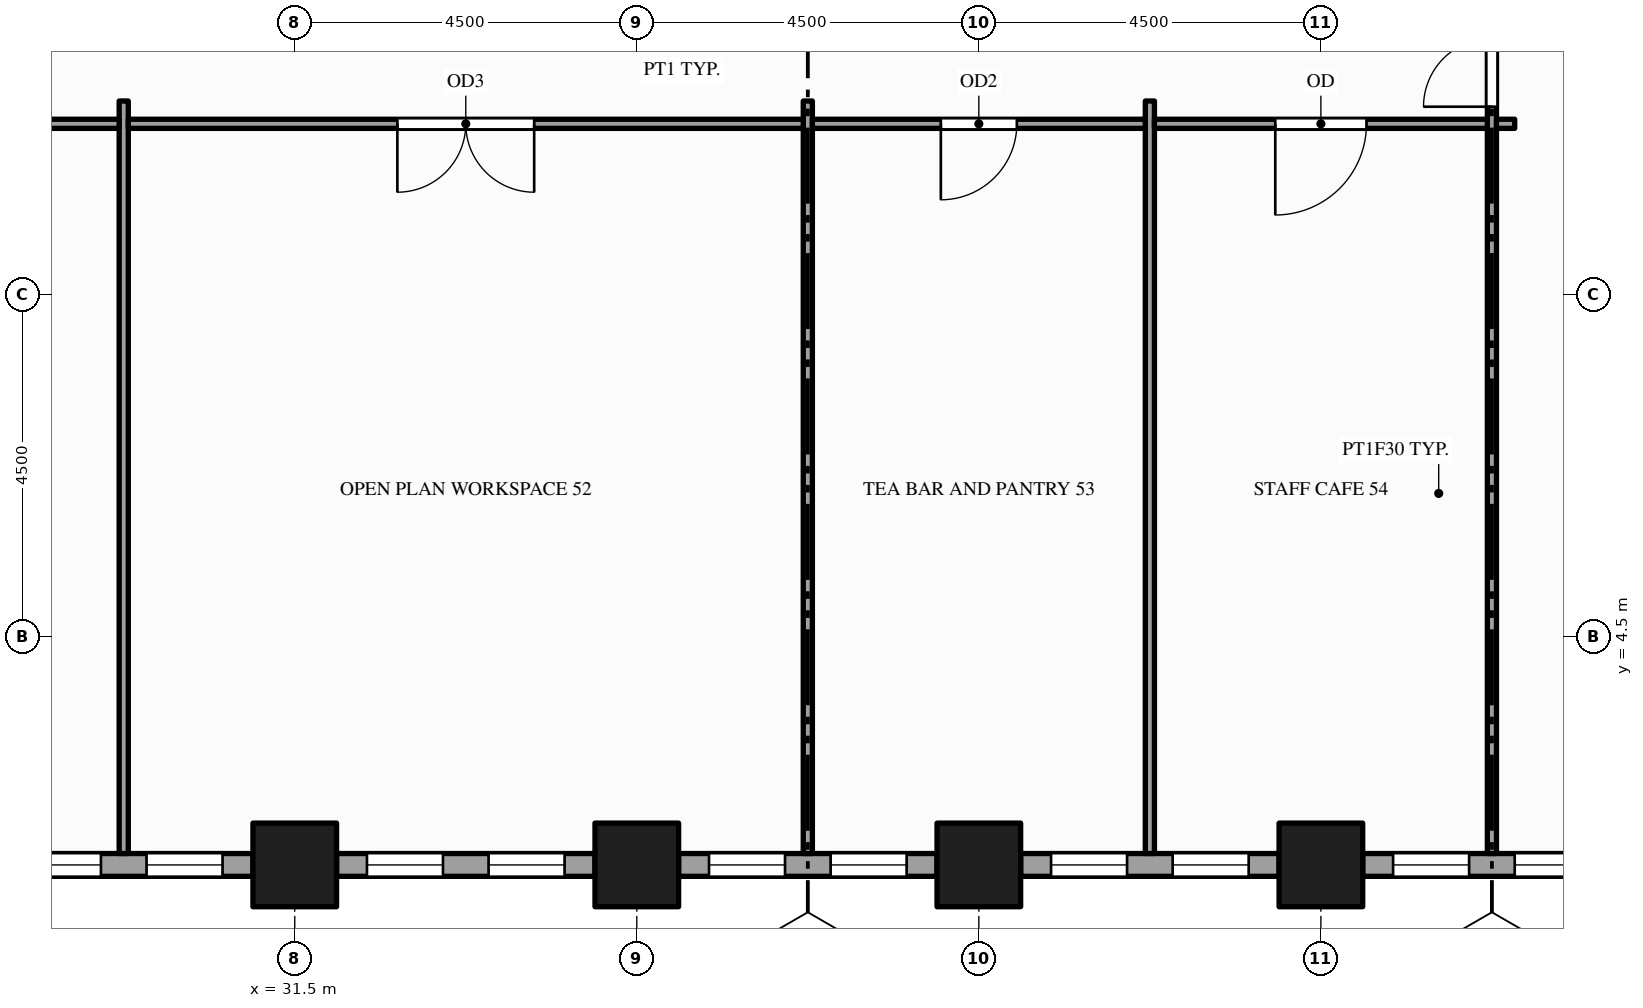
"""IFC4 building model, lengths in metres.
Left out: names, types, materials, properties, quantities, classifications, styles, units other than length and angle.
Written with IfcOpenShell. Run it as: python <this file> out.ifc"""

import sys

from ifc_helpers import new_model, si_unit, direction, frame, frame_2d, origin, origin_2d, place, context, subcontext, project, spatial, rectangle, hollow_rectangle, extrude, element, fill, save


model = new_model("IFC4")
c1 = context("Model", 3, precision=1e-05, world=origin(), true_north=direction((0.0, 1.0)))
c2 = subcontext(c1, "Body", "Model", "MODEL_VIEW")
j1 = project(units=[si_unit("LENGTHUNIT", "METRE"), si_unit("PLANEANGLEUNIT", "RADIAN")], contexts=[c1])
p1 = place(None, origin())
s1 = spatial("IfcSite", under=j1, at=p1, CompositionType="ELEMENT")
p2 = place(p1, origin())
s2 = spatial("IfcBuilding", under=s1, at=p2, CompositionType="ELEMENT")
p3 = place(p2, frame((0.0, 0.0, 41.0)))
s3 = spatial("IfcBuildingStorey", under=s2, at=p3, CompositionType="ELEMENT", Elevation=41.0)
for number, where, z_axis, x_axis in (
    (1, (31.5, 1.5, -0.15), (0.0, 0.0, 1.0), (1.0, 0.0, 0.0)),
    (2, (36.0, 1.5, -0.15), (0.0, 0.0, 1.0), (1.0, 0.0, 0.0)),
    (3, (40.5, 1.5, -0.15), (0.0, 0.0, 1.0), (1.0, 0.0, 0.0)),
    (4, (45.0, 1.5, -0.15), (0.0, 0.0, 1.0), (1.0, 0.0, 0.0)),
):
    element("IfcColumn", number, at=place(p3, frame(where, z_axis=z_axis, x_axis=x_axis)), inside=s3, PredefinedType="COLUMN", context=c2, shape_type="SweptSolid", body=[
        extrude(hollow_rectangle(XDim=1.1, YDim=1.1, WallThickness=0.06, at=origin_2d()), origin(), (0.0, 0.0, 1.0), 4.0),
    ])
p4 = place(p3, frame((27.55, 1.5, 0.0), z_axis=(0.0, 0.0, 1.0), x_axis=(1.0, 0.0, 0.0)))
e5 = element("IfcWall", 5, at=p4, inside=s3, PredefinedType="STANDARD", context=c2, shape_type="SweptSolid", body=[
    extrude(rectangle(XDim=3.4, YDim=0.3, at=frame_2d((1.7, 0.0))), origin(), (0.0, 0.0, 1.0), 3.144),
])
p5 = place(p4, frame((0.4, 0.0, 0.9)))
e6 = element("IfcOpeningElement", 6, at=p5, cuts=e5, PredefinedType="OPENING", context=c2, shape_type="SweptSolid", body=[
    extrude(rectangle(XDim=1.0, YDim=2.0, at=frame_2d((0.5, 1.0))), frame((0.0, 0.16, 0.0), z_axis=(0.0, -1.0, 0.0), x_axis=(1.0, 0.0, 0.0)), (0.0, 0.0, 1.0), 0.32),
])
p6 = place(p4, frame((2.0, 0.0, 0.9)))
e7 = element("IfcOpeningElement", 7, at=p6, cuts=e5, PredefinedType="OPENING", context=c2, shape_type="SweptSolid", body=[
    extrude(rectangle(XDim=1.0, YDim=2.0, at=frame_2d((0.5, 1.0))), frame((0.0, 0.16, 0.0), z_axis=(0.0, -1.0, 0.0), x_axis=(1.0, 0.0, 0.0)), (0.0, 0.0, 1.0), 0.32),
])
p7 = place(p3, frame((32.05, 1.5, 0.0), z_axis=(0.0, 0.0, 1.0), x_axis=(1.0, 0.0, 0.0)))
e8 = element("IfcWall", 8, at=p7, inside=s3, PredefinedType="STANDARD", context=c2, shape_type="SweptSolid", body=[
    extrude(rectangle(XDim=3.4, YDim=0.3, at=frame_2d((1.7, 0.0))), origin(), (0.0, 0.0, 1.0), 3.144),
])
p8 = place(p7, frame((0.4, 0.0, 0.9)))
e9 = element("IfcOpeningElement", 9, at=p8, cuts=e8, PredefinedType="OPENING", context=c2, shape_type="SweptSolid", body=[
    extrude(rectangle(XDim=1.0, YDim=2.0, at=frame_2d((0.5, 1.0))), frame((0.0, 0.16, 0.0), z_axis=(0.0, -1.0, 0.0), x_axis=(1.0, 0.0, 0.0)), (0.0, 0.0, 1.0), 0.32),
])
p9 = place(p7, frame((2.0, 0.0, 0.9)))
e10 = element("IfcOpeningElement", 10, at=p9, cuts=e8, PredefinedType="OPENING", context=c2, shape_type="SweptSolid", body=[
    extrude(rectangle(XDim=1.0, YDim=2.0, at=frame_2d((0.5, 1.0))), frame((0.0, 0.16, 0.0), z_axis=(0.0, -1.0, 0.0), x_axis=(1.0, 0.0, 0.0)), (0.0, 0.0, 1.0), 0.32),
])
p10 = place(p3, frame((36.55, 1.5, 0.0), z_axis=(0.0, 0.0, 1.0), x_axis=(1.0, 0.0, 0.0)))
e11 = element("IfcWall", 11, at=p10, inside=s3, PredefinedType="STANDARD", context=c2, shape_type="SweptSolid", body=[
    extrude(rectangle(XDim=3.4, YDim=0.3, at=frame_2d((1.7, 0.0))), origin(), (0.0, 0.0, 1.0), 3.144),
])
p11 = place(p10, frame((0.4, 0.0, 0.9)))
e12 = element("IfcOpeningElement", 12, at=p11, cuts=e11, PredefinedType="OPENING", context=c2, shape_type="SweptSolid", body=[
    extrude(rectangle(XDim=1.0, YDim=2.0, at=frame_2d((0.5, 1.0))), frame((0.0, 0.16, 0.0), z_axis=(0.0, -1.0, 0.0), x_axis=(1.0, 0.0, 0.0)), (0.0, 0.0, 1.0), 0.32),
])
p12 = place(p10, frame((2.0, 0.0, 0.9)))
e13 = element("IfcOpeningElement", 13, at=p12, cuts=e11, PredefinedType="OPENING", context=c2, shape_type="SweptSolid", body=[
    extrude(rectangle(XDim=1.0, YDim=2.0, at=frame_2d((0.5, 1.0))), frame((0.0, 0.16, 0.0), z_axis=(0.0, -1.0, 0.0), x_axis=(1.0, 0.0, 0.0)), (0.0, 0.0, 1.0), 0.32),
])
p13 = place(p3, frame((41.05, 1.5, 0.0), z_axis=(0.0, 0.0, 1.0), x_axis=(1.0, 0.0, 0.0)))
e14 = element("IfcWall", 14, at=p13, inside=s3, PredefinedType="STANDARD", context=c2, shape_type="SweptSolid", body=[
    extrude(rectangle(XDim=3.4, YDim=0.3, at=frame_2d((1.7, 0.0))), origin(), (0.0, 0.0, 1.0), 3.144),
])
p14 = place(p13, frame((0.4, 0.0, 0.9)))
e15 = element("IfcOpeningElement", 15, at=p14, cuts=e14, PredefinedType="OPENING", context=c2, shape_type="SweptSolid", body=[
    extrude(rectangle(XDim=1.0, YDim=2.0, at=frame_2d((0.5, 1.0))), frame((0.0, 0.16, 0.0), z_axis=(0.0, -1.0, 0.0), x_axis=(1.0, 0.0, 0.0)), (0.0, 0.0, 1.0), 0.32),
])
p15 = place(p13, frame((2.0, 0.0, 0.9)))
e16 = element("IfcOpeningElement", 16, at=p15, cuts=e14, PredefinedType="OPENING", context=c2, shape_type="SweptSolid", body=[
    extrude(rectangle(XDim=1.0, YDim=2.0, at=frame_2d((0.5, 1.0))), frame((0.0, 0.16, 0.0), z_axis=(0.0, -1.0, 0.0), x_axis=(1.0, 0.0, 0.0)), (0.0, 0.0, 1.0), 0.32),
])
p16 = place(p3, frame((45.55, 1.5, 0.0), z_axis=(0.0, 0.0, 1.0), x_axis=(1.0, 0.0, 0.0)))
e17 = element("IfcWall", 17, at=p16, inside=s3, PredefinedType="STANDARD", context=c2, shape_type="SweptSolid", body=[
    extrude(rectangle(XDim=3.4, YDim=0.3, at=frame_2d((1.7, 0.0))), origin(), (0.0, 0.0, 1.0), 3.144),
])
p17 = place(p16, frame((0.4, 0.0, 0.9)))
e18 = element("IfcOpeningElement", 18, at=p17, cuts=e17, PredefinedType="OPENING", context=c2, shape_type="SweptSolid", body=[
    extrude(rectangle(XDim=1.0, YDim=2.0, at=frame_2d((0.5, 1.0))), frame((0.0, 0.16, 0.0), z_axis=(0.0, -1.0, 0.0), x_axis=(1.0, 0.0, 0.0)), (0.0, 0.0, 1.0), 0.32),
])
p18 = place(p16, frame((2.0, 0.0, 0.9)))
e19 = element("IfcOpeningElement", 19, at=p18, cuts=e17, PredefinedType="OPENING", context=c2, shape_type="SweptSolid", body=[
    extrude(rectangle(XDim=1.0, YDim=2.0, at=frame_2d((0.5, 1.0))), frame((0.0, 0.16, 0.0), z_axis=(0.0, -1.0, 0.0), x_axis=(1.0, 0.0, 0.0)), (0.0, 0.0, 1.0), 0.32),
])
for number, where, z_axis, x_axis in (
    (20, (29.25, 1.65, 0.0), (0.0, 0.0, 1.0), (0.0, 1.0, 0.0)),
    (21, (38.25, 1.65, 0.0), (0.0, 0.0, 1.0), (0.0, 1.0, 0.0)),
    (22, (42.75, 1.65, 0.0), (0.0, 0.0, 1.0), (0.0, 1.0, 0.0)),
):
    element("IfcWall", number, at=place(p3, frame(where, z_axis=z_axis, x_axis=x_axis)), inside=s3, PredefinedType="PARTITIONING", context=c2, shape_type="SweptSolid", body=[
        extrude(rectangle(XDim=9.9, YDim=0.12, at=frame_2d((4.95, 0.0))), origin(), (0.0, 0.0, 1.0), 2.938),
    ])
p19 = place(p3, frame((47.25, 1.65, 0.0), z_axis=(0.0, 0.0, 1.0), x_axis=(0.0, 1.0, 0.0)))
e23 = element("IfcWall", 23, at=p19, inside=s3, PredefinedType="PARTITIONING", context=c2, shape_type="SweptSolid", body=[
    extrude(rectangle(XDim=22.2, YDim=0.12, at=frame_2d((11.1, 0.0))), origin(), (0.0, 0.0, 1.0), 2.938),
])
p20 = place(p19, frame((9.825, 0.0, 0.0)))
e24 = element("IfcOpeningElement", 24, at=p20, cuts=e23, PredefinedType="OPENING", context=c2, shape_type="SweptSolid", body=[
    extrude(rectangle(XDim=1.8, YDim=2.1, at=frame_2d((0.9, 1.05))), frame((0.0, 0.07, 0.0), z_axis=(0.0, -1.0, 0.0), x_axis=(1.0, 0.0, 0.0)), (0.0, 0.0, 1.0), 0.14),
])
p21 = place(p19, frame((12.85, 0.0, 0.0)))
e25 = element("IfcOpeningElement", 25, at=p21, cuts=e23, PredefinedType="OPENING", context=c2, shape_type="SweptSolid", body=[
    extrude(rectangle(XDim=0.9, YDim=2.1, at=frame_2d((0.45, 1.05))), frame((0.0, 0.07, 0.0), z_axis=(0.0, -1.0, 0.0), x_axis=(1.0, 0.0, 0.0)), (0.0, 0.0, 1.0), 0.14),
])
p22 = place(p19, frame((16.65, 0.0, 0.0)))
e26 = element("IfcOpeningElement", 26, at=p22, cuts=e23, PredefinedType="OPENING", context=c2, shape_type="SweptSolid", body=[
    extrude(rectangle(XDim=0.9, YDim=2.1, at=frame_2d((0.45, 1.05))), frame((0.0, 0.07, 0.0), z_axis=(0.0, -1.0, 0.0), x_axis=(1.0, 0.0, 0.0)), (0.0, 0.0, 1.0), 0.14),
])
p23 = place(p19, frame((20.35, 0.0, 0.0)))
e27 = element("IfcOpeningElement", 27, at=p23, cuts=e23, PredefinedType="OPENING", context=c2, shape_type="SweptSolid", body=[
    extrude(rectangle(XDim=1.0, YDim=2.1, at=frame_2d((0.5, 1.05))), frame((0.0, 0.07, 0.0), z_axis=(0.0, -1.0, 0.0), x_axis=(1.0, 0.0, 0.0)), (0.0, 0.0, 1.0), 0.14),
])
p24 = place(p3, frame((24.81, 11.25, 0.0), z_axis=(0.0, 0.0, 1.0), x_axis=(1.0, 0.0, 0.0)))
e28 = element("IfcWall", 28, at=p24, inside=s3, PredefinedType="PARTITIONING", context=c2, shape_type="SweptSolid", body=[
    extrude(rectangle(XDim=4.38, YDim=0.12, at=frame_2d((2.19, 0.0))), origin(), (0.0, 0.0, 1.0), 2.938),
])
p25 = place(p24, frame((1.69, 0.0, 0.0)))
e29 = element("IfcOpeningElement", 29, at=p25, cuts=e28, PredefinedType="OPENING", context=c2, shape_type="SweptSolid", body=[
    extrude(rectangle(XDim=1.0, YDim=2.1, at=frame_2d((0.5, 1.05))), frame((0.0, 0.07, 0.0), z_axis=(0.0, -1.0, 0.0), x_axis=(1.0, 0.0, 0.0)), (0.0, 0.0, 1.0), 0.14),
])
p26 = place(p3, frame((29.31, 11.25, 0.0), z_axis=(0.0, 0.0, 1.0), x_axis=(1.0, 0.0, 0.0)))
e30 = element("IfcWall", 30, at=p26, inside=s3, PredefinedType="PARTITIONING", context=c2, shape_type="SweptSolid", body=[
    extrude(rectangle(XDim=8.88, YDim=0.12, at=frame_2d((4.44, 0.0))), origin(), (0.0, 0.0, 1.0), 2.938),
])
p27 = place(p26, frame((3.54, 0.0, 0.0)))
e31 = element("IfcOpeningElement", 31, at=p27, cuts=e30, PredefinedType="OPENING", context=c2, shape_type="SweptSolid", body=[
    extrude(rectangle(XDim=1.8, YDim=2.1, at=frame_2d((0.9, 1.05))), frame((0.0, 0.07, 0.0), z_axis=(0.0, -1.0, 0.0), x_axis=(1.0, 0.0, 0.0)), (0.0, 0.0, 1.0), 0.14),
])
p28 = place(p3, frame((38.31, 11.25, 0.0), z_axis=(0.0, 0.0, 1.0), x_axis=(1.0, 0.0, 0.0)))
e32 = element("IfcWall", 32, at=p28, inside=s3, PredefinedType="PARTITIONING", context=c2, shape_type="SweptSolid", body=[
    extrude(rectangle(XDim=4.38, YDim=0.12, at=frame_2d((2.19, 0.0))), origin(), (0.0, 0.0, 1.0), 2.938),
])
p29 = place(p28, frame((1.69, 0.0, 0.0)))
e33 = element("IfcOpeningElement", 33, at=p29, cuts=e32, PredefinedType="OPENING", context=c2, shape_type="SweptSolid", body=[
    extrude(rectangle(XDim=1.0, YDim=2.1, at=frame_2d((0.5, 1.05))), frame((0.0, 0.07, 0.0), z_axis=(0.0, -1.0, 0.0), x_axis=(1.0, 0.0, 0.0)), (0.0, 0.0, 1.0), 0.14),
])
p30 = place(p3, frame((42.81, 11.25, 0.0), z_axis=(0.0, 0.0, 1.0), x_axis=(1.0, 0.0, 0.0)))
e34 = element("IfcWall", 34, at=p30, inside=s3, PredefinedType="PARTITIONING", context=c2, shape_type="SweptSolid", body=[
    extrude(rectangle(XDim=4.38, YDim=0.12, at=frame_2d((2.19, 0.0))), origin(), (0.0, 0.0, 1.0), 2.938),
])
p31 = place(p30, frame((1.59, 0.0, 0.0)))
e35 = element("IfcOpeningElement", 35, at=p31, cuts=e34, PredefinedType="OPENING", context=c2, shape_type="SweptSolid", body=[
    extrude(rectangle(XDim=1.2, YDim=2.1, at=frame_2d((0.6, 1.05))), frame((0.0, 0.07, 0.0), z_axis=(0.0, -1.0, 0.0), x_axis=(1.0, 0.0, 0.0)), (0.0, 0.0, 1.0), 0.14),
])
p32 = place(p3, frame((47.31, 11.25, 0.0), z_axis=(0.0, 0.0, 1.0), x_axis=(1.0, 0.0, 0.0)))
e36 = element("IfcWall", 36, at=p32, inside=s3, PredefinedType="PARTITIONING", context=c2, shape_type="SweptSolid", body=[
    extrude(rectangle(XDim=0.24, YDim=0.12, at=frame_2d((0.12, 0.0))), origin(), (0.0, 0.0, 1.0), 2.938),
])
p33 = place(p5, origin())
e37 = element("IfcWindow", 37, at=p33, inside=s3, PartitioningType="SINGLE_PANEL", PredefinedType="WINDOW", context=c2, shape_type="SweptSolid", body=[
    extrude(rectangle(XDim=1.0, YDim=2.0, at=frame_2d((0.5, 1.0))), frame((0.0, 0.03, 0.0), z_axis=(0.0, -1.0, 0.0), x_axis=(1.0, 0.0, 0.0)), (0.0, 0.0, 1.0), 0.06),
])
fill(e6, e37)
p34 = place(p6, origin())
e38 = element("IfcWindow", 38, at=p34, inside=s3, PartitioningType="SINGLE_PANEL", PredefinedType="WINDOW", context=c2, shape_type="SweptSolid", body=[
    extrude(rectangle(XDim=1.0, YDim=2.0, at=frame_2d((0.5, 1.0))), frame((0.0, 0.03, 0.0), z_axis=(0.0, -1.0, 0.0), x_axis=(1.0, 0.0, 0.0)), (0.0, 0.0, 1.0), 0.06),
])
fill(e7, e38)
p35 = place(p8, origin())
e39 = element("IfcWindow", 39, at=p35, inside=s3, PartitioningType="SINGLE_PANEL", PredefinedType="WINDOW", context=c2, shape_type="SweptSolid", body=[
    extrude(rectangle(XDim=1.0, YDim=2.0, at=frame_2d((0.5, 1.0))), frame((0.0, 0.03, 0.0), z_axis=(0.0, -1.0, 0.0), x_axis=(1.0, 0.0, 0.0)), (0.0, 0.0, 1.0), 0.06),
])
fill(e9, e39)
p36 = place(p9, origin())
e40 = element("IfcWindow", 40, at=p36, inside=s3, PartitioningType="SINGLE_PANEL", PredefinedType="WINDOW", context=c2, shape_type="SweptSolid", body=[
    extrude(rectangle(XDim=1.0, YDim=2.0, at=frame_2d((0.5, 1.0))), frame((0.0, 0.03, 0.0), z_axis=(0.0, -1.0, 0.0), x_axis=(1.0, 0.0, 0.0)), (0.0, 0.0, 1.0), 0.06),
])
fill(e10, e40)
p37 = place(p11, origin())
e41 = element("IfcWindow", 41, at=p37, inside=s3, PartitioningType="SINGLE_PANEL", PredefinedType="WINDOW", context=c2, shape_type="SweptSolid", body=[
    extrude(rectangle(XDim=1.0, YDim=2.0, at=frame_2d((0.5, 1.0))), frame((0.0, 0.03, 0.0), z_axis=(0.0, -1.0, 0.0), x_axis=(1.0, 0.0, 0.0)), (0.0, 0.0, 1.0), 0.06),
])
fill(e12, e41)
p38 = place(p12, origin())
e42 = element("IfcWindow", 42, at=p38, inside=s3, PartitioningType="SINGLE_PANEL", PredefinedType="WINDOW", context=c2, shape_type="SweptSolid", body=[
    extrude(rectangle(XDim=1.0, YDim=2.0, at=frame_2d((0.5, 1.0))), frame((0.0, 0.03, 0.0), z_axis=(0.0, -1.0, 0.0), x_axis=(1.0, 0.0, 0.0)), (0.0, 0.0, 1.0), 0.06),
])
fill(e13, e42)
p39 = place(p14, origin())
e43 = element("IfcWindow", 43, at=p39, inside=s3, PartitioningType="SINGLE_PANEL", PredefinedType="WINDOW", context=c2, shape_type="SweptSolid", body=[
    extrude(rectangle(XDim=1.0, YDim=2.0, at=frame_2d((0.5, 1.0))), frame((0.0, 0.03, 0.0), z_axis=(0.0, -1.0, 0.0), x_axis=(1.0, 0.0, 0.0)), (0.0, 0.0, 1.0), 0.06),
])
fill(e15, e43)
p40 = place(p15, origin())
e44 = element("IfcWindow", 44, at=p40, inside=s3, PartitioningType="SINGLE_PANEL", PredefinedType="WINDOW", context=c2, shape_type="SweptSolid", body=[
    extrude(rectangle(XDim=1.0, YDim=2.0, at=frame_2d((0.5, 1.0))), frame((0.0, 0.03, 0.0), z_axis=(0.0, -1.0, 0.0), x_axis=(1.0, 0.0, 0.0)), (0.0, 0.0, 1.0), 0.06),
])
fill(e16, e44)
p41 = place(p17, origin())
e45 = element("IfcWindow", 45, at=p41, inside=s3, PartitioningType="SINGLE_PANEL", PredefinedType="WINDOW", context=c2, shape_type="SweptSolid", body=[
    extrude(rectangle(XDim=1.0, YDim=2.0, at=frame_2d((0.5, 1.0))), frame((0.0, 0.03, 0.0), z_axis=(0.0, -1.0, 0.0), x_axis=(1.0, 0.0, 0.0)), (0.0, 0.0, 1.0), 0.06),
])
fill(e18, e45)
p42 = place(p18, origin())
e46 = element("IfcWindow", 46, at=p42, inside=s3, PartitioningType="SINGLE_PANEL", PredefinedType="WINDOW", context=c2, shape_type="SweptSolid", body=[
    extrude(rectangle(XDim=1.0, YDim=2.0, at=frame_2d((0.5, 1.0))), frame((0.0, 0.03, 0.0), z_axis=(0.0, -1.0, 0.0), x_axis=(1.0, 0.0, 0.0)), (0.0, 0.0, 1.0), 0.06),
])
fill(e19, e46)
p43 = place(p20, origin())
e47 = element("IfcDoor", 47, at=p43, inside=s3, OperationType="DOUBLE_DOOR_SINGLE_SWING", PredefinedType="DOOR", context=c2, shape_type="SweptSolid", body=[
    extrude(rectangle(XDim=1.8, YDim=2.1, at=frame_2d((0.9, 1.05))), frame((0.0, 0.025, 0.0), z_axis=(0.0, -1.0, 0.0), x_axis=(1.0, 0.0, 0.0)), (0.0, 0.0, 1.0), 0.05),
])
fill(e24, e47)
p44 = place(p27, origin())
e48 = element("IfcDoor", 48, at=p44, inside=s3, OperationType="DOUBLE_DOOR_SINGLE_SWING", PredefinedType="DOOR", context=c2, shape_type="SweptSolid", body=[
    extrude(rectangle(XDim=1.8, YDim=2.1, at=frame_2d((0.9, 1.05))), frame((0.0, 0.025, 0.0), z_axis=(0.0, -1.0, 0.0), x_axis=(1.0, 0.0, 0.0)), (0.0, 0.0, 1.0), 0.05),
])
fill(e31, e48)
p45 = place(p29, origin())
e49 = element("IfcDoor", 49, at=p45, inside=s3, OperationType="SINGLE_SWING_LEFT", PredefinedType="DOOR", context=c2, shape_type="SweptSolid", body=[
    extrude(rectangle(XDim=1.0, YDim=2.1, at=frame_2d((0.5, 1.05))), frame((0.0, 0.025, 0.0), z_axis=(0.0, -1.0, 0.0), x_axis=(1.0, 0.0, 0.0)), (0.0, 0.0, 1.0), 0.05),
])
fill(e33, e49)
p46 = place(p31, origin())
e50 = element("IfcDoor", 50, at=p46, inside=s3, OperationType="SINGLE_SWING_LEFT", PredefinedType="DOOR", context=c2, shape_type="SweptSolid", body=[
    extrude(rectangle(XDim=1.2, YDim=2.1, at=frame_2d((0.6, 1.05))), frame((0.0, 0.025, 0.0), z_axis=(0.0, -1.0, 0.0), x_axis=(1.0, 0.0, 0.0)), (0.0, 0.0, 1.0), 0.05),
])
fill(e35, e50)
save(model, sys.argv[1])
